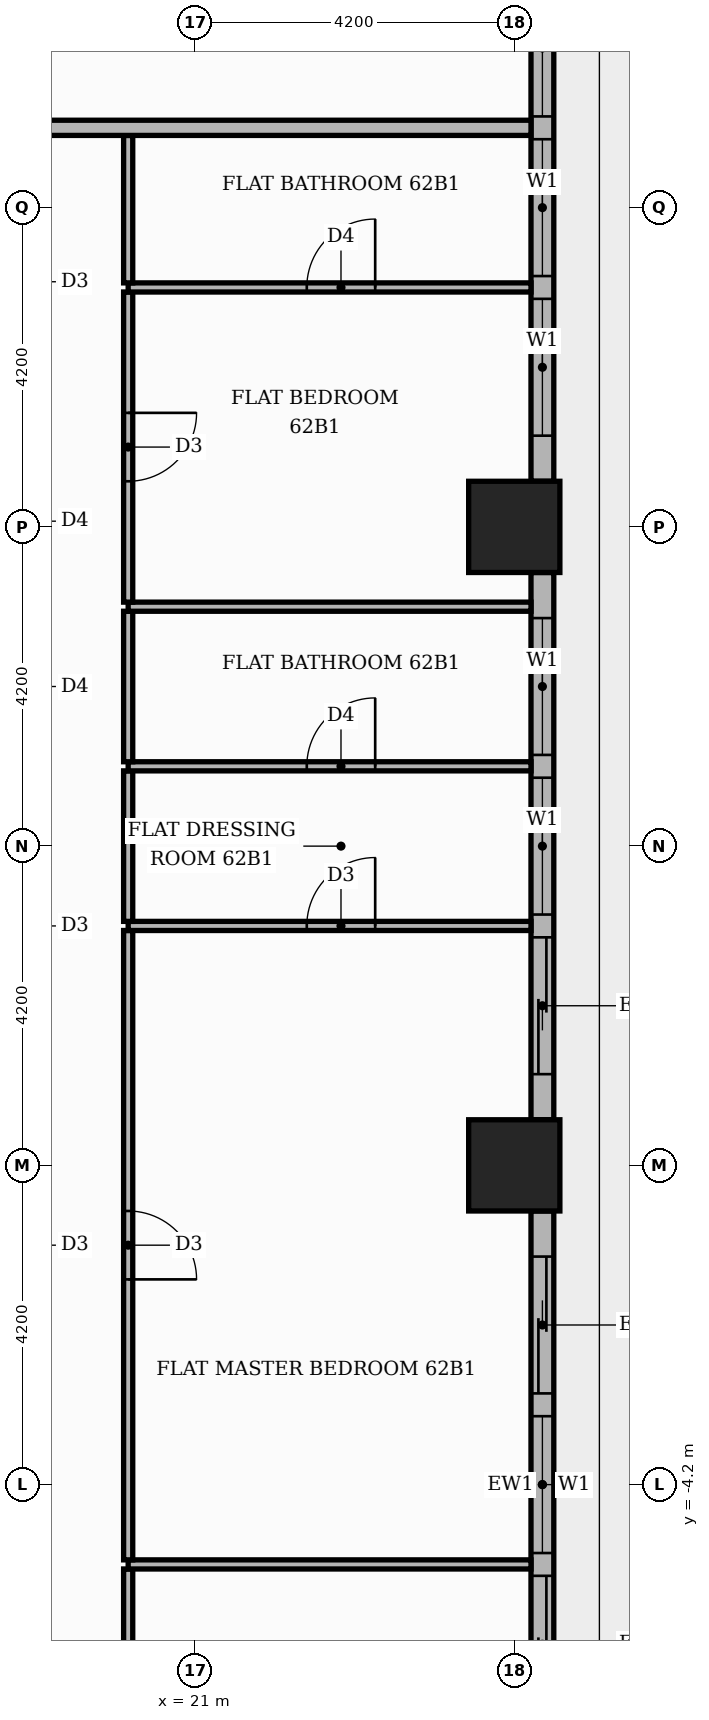
"""IFC4 building model, lengths in metres.
Left out: names, types, materials, properties, quantities, classifications, styles, units other than length and angle.
Written with IfcOpenShell. Run it as: python <this file> out.ifc"""

import sys

from ifc_helpers import new_model, si_unit, direction, frame, frame_2d, origin, origin_2d, place, context, subcontext, project, spatial, rectangle, extrude, element, fill, save


model = new_model("IFC4")
c1 = context("Model", 3, precision=1e-05, world=origin(), true_north=direction((0.0, 1.0)))
c2 = subcontext(c1, "Body", "Model", "MODEL_VIEW")
j1 = project(units=[si_unit("LENGTHUNIT", "METRE"), si_unit("PLANEANGLEUNIT", "RADIAN")], contexts=[c1])
p1 = place(None, origin())
s1 = spatial("IfcSite", under=j1, at=p1, CompositionType="ELEMENT")
p2 = place(p1, origin())
s2 = spatial("IfcBuilding", under=s1, at=p2, CompositionType="ELEMENT")
p3 = place(p2, frame((0.0, 0.0, 260.1)))
s3 = spatial("IfcBuildingStorey", under=s2, at=p3, CompositionType="ELEMENT", Elevation=260.1)
for number, where, z_axis, x_axis in (
    (1, (25.2, 0.0, 0.0), (0.0, 0.0, 1.0), (1.0, 0.0, 0.0)),
    (2, (25.2, 8.4, 0.0), (0.0, 0.0, 1.0), (1.0, 0.0, 0.0)),
):
    element("IfcColumn", number, at=place(p3, frame(where, z_axis=z_axis, x_axis=x_axis)), inside=s3, PredefinedType="COLUMN", context=c2, shape_type="SweptSolid", body=[
        extrude(rectangle(XDim=1.2, YDim=1.2, at=origin_2d()), origin(), (0.0, 0.0, 1.0), 3.9),
    ])
p4 = place(p3, frame((25.57, -7.8, 0.0), z_axis=(0.0, 0.0, 1.0), x_axis=(0.0, 1.0, 0.0)))
e3 = element("IfcWall", 3, at=p4, inside=s3, PredefinedType="STANDARD", context=c2, shape_type="SweptSolid", body=[
    extrude(rectangle(XDim=7.2, YDim=0.3, at=frame_2d((3.6, 0.0))), origin(), (0.0, 0.0, 1.0), 3.48),
])
p5 = place(p4, frame((0.6, 0.0, 0.0)))
e4 = element("IfcOpeningElement", 4, at=p5, cuts=e3, PredefinedType="OPENING", context=c2, shape_type="SweptSolid", body=[
    extrude(rectangle(XDim=1.8, YDim=2.4, at=frame_2d((0.9, 1.2))), frame((0.0, 0.16, 0.0), z_axis=(0.0, -1.0, 0.0), x_axis=(1.0, 0.0, 0.0)), (0.0, 0.0, 1.0), 0.32),
])
p6 = place(p4, frame((2.7, 0.0, 0.9)))
e5 = element("IfcOpeningElement", 5, at=p6, cuts=e3, PredefinedType="OPENING", context=c2, shape_type="SweptSolid", body=[
    extrude(rectangle(XDim=1.8, YDim=2.1, at=frame_2d((0.9, 1.05))), frame((0.0, 0.16, 0.0), z_axis=(0.0, -1.0, 0.0), x_axis=(1.0, 0.0, 0.0)), (0.0, 0.0, 1.0), 0.32),
])
p7 = place(p4, frame((4.8, 0.0, 0.0)))
e6 = element("IfcOpeningElement", 6, at=p7, cuts=e3, PredefinedType="OPENING", context=c2, shape_type="SweptSolid", body=[
    extrude(rectangle(XDim=1.8, YDim=2.4, at=frame_2d((0.9, 1.2))), frame((0.0, 0.16, 0.0), z_axis=(0.0, -1.0, 0.0), x_axis=(1.0, 0.0, 0.0)), (0.0, 0.0, 1.0), 0.32),
])
p8 = place(p3, frame((25.57, 0.6, 0.0), z_axis=(0.0, 0.0, 1.0), x_axis=(0.0, 1.0, 0.0)))
e7 = element("IfcWall", 7, at=p8, inside=s3, PredefinedType="STANDARD", context=c2, shape_type="SweptSolid", body=[
    extrude(rectangle(XDim=7.2, YDim=0.3, at=frame_2d((3.6, 0.0))), origin(), (0.0, 0.0, 1.0), 3.48),
])
p9 = place(p8, frame((0.6, 0.0, 0.0)))
e8 = element("IfcOpeningElement", 8, at=p9, cuts=e7, PredefinedType="OPENING", context=c2, shape_type="SweptSolid", body=[
    extrude(rectangle(XDim=1.8, YDim=2.4, at=frame_2d((0.9, 1.2))), frame((0.0, 0.16, 0.0), z_axis=(0.0, -1.0, 0.0), x_axis=(1.0, 0.0, 0.0)), (0.0, 0.0, 1.0), 0.32),
])
p10 = place(p8, frame((2.7, 0.0, 0.9)))
e9 = element("IfcOpeningElement", 9, at=p10, cuts=e7, PredefinedType="OPENING", context=c2, shape_type="SweptSolid", body=[
    extrude(rectangle(XDim=1.8, YDim=2.1, at=frame_2d((0.9, 1.05))), frame((0.0, 0.16, 0.0), z_axis=(0.0, -1.0, 0.0), x_axis=(1.0, 0.0, 0.0)), (0.0, 0.0, 1.0), 0.32),
])
p11 = place(p8, frame((4.8, 0.0, 0.9)))
e10 = element("IfcOpeningElement", 10, at=p11, cuts=e7, PredefinedType="OPENING", context=c2, shape_type="SweptSolid", body=[
    extrude(rectangle(XDim=1.8, YDim=2.1, at=frame_2d((0.9, 1.05))), frame((0.0, 0.16, 0.0), z_axis=(0.0, -1.0, 0.0), x_axis=(1.0, 0.0, 0.0)), (0.0, 0.0, 1.0), 0.32),
])
p12 = place(p3, frame((25.57, 9.0, 0.0), z_axis=(0.0, 0.0, 1.0), x_axis=(0.0, 1.0, 0.0)))
e11 = element("IfcWall", 11, at=p12, inside=s3, PredefinedType="STANDARD", context=c2, shape_type="SweptSolid", body=[
    extrude(rectangle(XDim=7.2, YDim=0.3, at=frame_2d((3.6, 0.0))), origin(), (0.0, 0.0, 1.0), 3.48),
])
p13 = place(p12, frame((0.6, 0.0, 0.9)))
e12 = element("IfcOpeningElement", 12, at=p13, cuts=e11, PredefinedType="OPENING", context=c2, shape_type="SweptSolid", body=[
    extrude(rectangle(XDim=1.8, YDim=2.1, at=frame_2d((0.9, 1.05))), frame((0.0, 0.16, 0.0), z_axis=(0.0, -1.0, 0.0), x_axis=(1.0, 0.0, 0.0)), (0.0, 0.0, 1.0), 0.32),
])
p14 = place(p12, frame((2.7, 0.0, 0.9)))
e13 = element("IfcOpeningElement", 13, at=p14, cuts=e11, PredefinedType="OPENING", context=c2, shape_type="SweptSolid", body=[
    extrude(rectangle(XDim=1.8, YDim=2.1, at=frame_2d((0.9, 1.05))), frame((0.0, 0.16, 0.0), z_axis=(0.0, -1.0, 0.0), x_axis=(1.0, 0.0, 0.0)), (0.0, 0.0, 1.0), 0.32),
])
p15 = place(p12, frame((4.8, 0.0, 0.9)))
e14 = element("IfcOpeningElement", 14, at=p15, cuts=e11, PredefinedType="OPENING", context=c2, shape_type="SweptSolid", body=[
    extrude(rectangle(XDim=1.8, YDim=2.1, at=frame_2d((0.9, 1.05))), frame((0.0, 0.16, 0.0), z_axis=(0.0, -1.0, 0.0), x_axis=(1.0, 0.0, 0.0)), (0.0, 0.0, 1.0), 0.32),
])
p16 = place(p3, frame((20.12, -11.49, 0.0), z_axis=(0.0, 0.0, 1.0), x_axis=(0.0, 1.0, 0.0)))
e15 = element("IfcWall", 15, at=p16, inside=s3, PredefinedType="PARTITIONING", context=c2, shape_type="SweptSolid", body=[
    extrude(rectangle(XDim=6.18, YDim=0.12, at=frame_2d((3.09, 0.0))), origin(), (0.0, 0.0, 1.0), 3.48),
])
p17 = place(p16, frame((2.59, 0.0, 0.0)))
e16 = element("IfcOpeningElement", 16, at=p17, cuts=e15, PredefinedType="OPENING", context=c2, shape_type="SweptSolid", body=[
    extrude(rectangle(XDim=1.0, YDim=2.1, at=frame_2d((0.5, 1.05))), frame((0.0, 0.07, 0.0), z_axis=(0.0, -1.0, 0.0), x_axis=(1.0, 0.0, 0.0)), (0.0, 0.0, 1.0), 0.14),
])
p18 = place(p3, frame((20.12, -5.25, 0.0), z_axis=(0.0, 0.0, 1.0), x_axis=(1.0, 0.0, 0.0)))
e17 = element("IfcWall", 17, at=p18, inside=s3, PredefinedType="PARTITIONING", context=c2, shape_type="SweptSolid", body=[
    extrude(rectangle(XDim=5.3, YDim=0.12, at=frame_2d((2.65, 0.0))), origin(), (0.0, 0.0, 1.0), 3.48),
])
p19 = place(p3, frame((20.12, -5.19, 0.0), z_axis=(0.0, 0.0, 1.0), x_axis=(0.0, 1.0, 0.0)))
e18 = element("IfcWall", 18, at=p19, inside=s3, PredefinedType="PARTITIONING", context=c2, shape_type="SweptSolid", body=[
    extrude(rectangle(XDim=8.28, YDim=0.12, at=frame_2d((4.14, 0.0))), origin(), (0.0, 0.0, 1.0), 3.48),
])
p20 = place(p19, frame((3.69, 0.0, 0.0)))
e19 = element("IfcOpeningElement", 19, at=p20, cuts=e18, PredefinedType="OPENING", context=c2, shape_type="SweptSolid", body=[
    extrude(rectangle(XDim=0.9, YDim=2.1, at=frame_2d((0.45, 1.05))), frame((0.0, 0.07, 0.0), z_axis=(0.0, -1.0, 0.0), x_axis=(1.0, 0.0, 0.0)), (0.0, 0.0, 1.0), 0.14),
])
p21 = place(p3, frame((20.12, 3.15, 0.0), z_axis=(0.0, 0.0, 1.0), x_axis=(1.0, 0.0, 0.0)))
e20 = element("IfcWall", 20, at=p21, inside=s3, PredefinedType="PARTITIONING", context=c2, shape_type="SweptSolid", body=[
    extrude(rectangle(XDim=5.3, YDim=0.12, at=frame_2d((2.65, 0.0))), origin(), (0.0, 0.0, 1.0), 3.48),
])
p22 = place(p21, frame((2.35, 0.0, 0.0)))
e21 = element("IfcOpeningElement", 21, at=p22, cuts=e20, PredefinedType="OPENING", context=c2, shape_type="SweptSolid", body=[
    extrude(rectangle(XDim=0.9, YDim=2.1, at=frame_2d((0.45, 1.05))), frame((0.0, 0.07, 0.0), z_axis=(0.0, -1.0, 0.0), x_axis=(1.0, 0.0, 0.0)), (0.0, 0.0, 1.0), 0.14),
])
p23 = place(p3, frame((20.12, 3.21, 0.0), z_axis=(0.0, 0.0, 1.0), x_axis=(0.0, 1.0, 0.0)))
e22 = element("IfcWall", 22, at=p23, inside=s3, PredefinedType="PARTITIONING", context=c2, shape_type="SweptSolid", body=[
    extrude(rectangle(XDim=1.98, YDim=0.12, at=frame_2d((0.99, 0.0))), origin(), (0.0, 0.0, 1.0), 3.48),
])
p24 = place(p3, frame((20.12, 5.25, 0.0), z_axis=(0.0, 0.0, 1.0), x_axis=(1.0, 0.0, 0.0)))
e23 = element("IfcWall", 23, at=p24, inside=s3, PredefinedType="PARTITIONING", context=c2, shape_type="SweptSolid", body=[
    extrude(rectangle(XDim=5.3, YDim=0.12, at=frame_2d((2.65, 0.0))), origin(), (0.0, 0.0, 1.0), 3.48),
])
p25 = place(p24, frame((2.35, 0.0, 0.0)))
e24 = element("IfcOpeningElement", 24, at=p25, cuts=e23, PredefinedType="OPENING", context=c2, shape_type="SweptSolid", body=[
    extrude(rectangle(XDim=0.9, YDim=2.1, at=frame_2d((0.45, 1.05))), frame((0.0, 0.07, 0.0), z_axis=(0.0, -1.0, 0.0), x_axis=(1.0, 0.0, 0.0)), (0.0, 0.0, 1.0), 0.14),
])
p26 = place(p3, frame((20.12, 5.31, 0.0), z_axis=(0.0, 0.0, 1.0), x_axis=(0.0, 1.0, 0.0)))
e25 = element("IfcWall", 25, at=p26, inside=s3, PredefinedType="PARTITIONING", context=c2, shape_type="SweptSolid", body=[
    extrude(rectangle(XDim=1.98, YDim=0.12, at=frame_2d((0.99, 0.0))), origin(), (0.0, 0.0, 1.0), 3.48),
])
p27 = place(p3, frame((20.12, 7.35, 0.0), z_axis=(0.0, 0.0, 1.0), x_axis=(1.0, 0.0, 0.0)))
e26 = element("IfcWall", 26, at=p27, inside=s3, PredefinedType="PARTITIONING", context=c2, shape_type="SweptSolid", body=[
    extrude(rectangle(XDim=5.3, YDim=0.12, at=frame_2d((2.65, 0.0))), origin(), (0.0, 0.0, 1.0), 3.48),
])
p28 = place(p3, frame((20.12, 7.41, 0.0), z_axis=(0.0, 0.0, 1.0), x_axis=(0.0, 1.0, 0.0)))
e27 = element("IfcWall", 27, at=p28, inside=s3, PredefinedType="PARTITIONING", context=c2, shape_type="SweptSolid", body=[
    extrude(rectangle(XDim=4.08, YDim=0.12, at=frame_2d((2.04, 0.0))), origin(), (0.0, 0.0, 1.0), 3.48),
])
p29 = place(p28, frame((1.59, 0.0, 0.0)))
e28 = element("IfcOpeningElement", 28, at=p29, cuts=e27, PredefinedType="OPENING", context=c2, shape_type="SweptSolid", body=[
    extrude(rectangle(XDim=0.9, YDim=2.1, at=frame_2d((0.45, 1.05))), frame((0.0, 0.07, 0.0), z_axis=(0.0, -1.0, 0.0), x_axis=(1.0, 0.0, 0.0)), (0.0, 0.0, 1.0), 0.14),
])
p30 = place(p3, frame((20.12, 11.55, 0.0), z_axis=(0.0, 0.0, 1.0), x_axis=(1.0, 0.0, 0.0)))
e29 = element("IfcWall", 29, at=p30, inside=s3, PredefinedType="PARTITIONING", context=c2, shape_type="SweptSolid", body=[
    extrude(rectangle(XDim=5.3, YDim=0.12, at=frame_2d((2.65, 0.0))), origin(), (0.0, 0.0, 1.0), 3.48),
])
p31 = place(p30, frame((2.35, 0.0, 0.0)))
e30 = element("IfcOpeningElement", 30, at=p31, cuts=e29, PredefinedType="OPENING", context=c2, shape_type="SweptSolid", body=[
    extrude(rectangle(XDim=0.9, YDim=2.1, at=frame_2d((0.45, 1.05))), frame((0.0, 0.07, 0.0), z_axis=(0.0, -1.0, 0.0), x_axis=(1.0, 0.0, 0.0)), (0.0, 0.0, 1.0), 0.14),
])
p32 = place(p3, frame((20.12, 11.61, 0.0), z_axis=(0.0, 0.0, 1.0), x_axis=(0.0, 1.0, 0.0)))
e31 = element("IfcWall", 31, at=p32, inside=s3, PredefinedType="PARTITIONING", context=c2, shape_type="SweptSolid", body=[
    extrude(rectangle(XDim=1.94, YDim=0.12, at=frame_2d((0.97, 0.0))), origin(), (0.0, 0.0, 1.0), 3.48),
])
p33 = place(p3, frame((-13.65, 13.65, 0.0), z_axis=(0.0, 0.0, 1.0), x_axis=(1.0, 0.0, 0.0)))
e32 = element("IfcWall", 32, at=p33, inside=s3, PredefinedType="PARTITIONING", context=c2, shape_type="SweptSolid", body=[
    extrude(rectangle(XDim=39.07, YDim=0.2, at=frame_2d((19.535, 0.0))), origin(), (0.0, 0.0, 1.0), 3.48),
])
p34 = place(p33, frame((24.65, 0.0, 0.0)))
e33 = element("IfcOpeningElement", 33, at=p34, cuts=e32, PredefinedType="OPENING", context=c2, shape_type="SweptSolid", body=[
    extrude(rectangle(XDim=1.1, YDim=2.4, at=frame_2d((0.55, 1.2))), frame((0.0, 0.11, 0.0), z_axis=(0.0, -1.0, 0.0), x_axis=(1.0, 0.0, 0.0)), (0.0, 0.0, 1.0), 0.22),
])
p35 = place(p33, frame((14.15, 0.0, 0.0)))
e34 = element("IfcOpeningElement", 34, at=p35, cuts=e32, PredefinedType="OPENING", context=c2, shape_type="SweptSolid", body=[
    extrude(rectangle(XDim=1.1, YDim=2.4, at=frame_2d((0.55, 1.2))), frame((0.0, 0.11, 0.0), z_axis=(0.0, -1.0, 0.0), x_axis=(1.0, 0.0, 0.0)), (0.0, 0.0, 1.0), 0.22),
])
p36 = place(p5, origin())
e35 = element("IfcDoor", 35, at=p36, inside=s3, OperationType="SLIDING_TO_LEFT", PredefinedType="DOOR", context=c2, shape_type="SweptSolid", body=[
    extrude(rectangle(XDim=1.8, YDim=2.4, at=frame_2d((0.9, 1.2))), frame((0.0, 0.025, 0.0), z_axis=(0.0, -1.0, 0.0), x_axis=(1.0, 0.0, 0.0)), (0.0, 0.0, 1.0), 0.05),
])
fill(e4, e35)
p37 = place(p6, origin())
e36 = element("IfcWindow", 36, at=p37, inside=s3, PartitioningType="SINGLE_PANEL", PredefinedType="WINDOW", context=c2, shape_type="SweptSolid", body=[
    extrude(rectangle(XDim=1.8, YDim=2.1, at=frame_2d((0.9, 1.05))), frame((0.0, 0.03, 0.0), z_axis=(0.0, -1.0, 0.0), x_axis=(1.0, 0.0, 0.0)), (0.0, 0.0, 1.0), 0.06),
])
fill(e5, e36)
p38 = place(p7, origin())
e37 = element("IfcDoor", 37, at=p38, inside=s3, OperationType="SLIDING_TO_RIGHT", PredefinedType="DOOR", context=c2, shape_type="SweptSolid", body=[
    extrude(rectangle(XDim=1.8, YDim=2.4, at=frame_2d((0.9, 1.2))), frame((0.0, 0.025, 0.0), z_axis=(0.0, -1.0, 0.0), x_axis=(1.0, 0.0, 0.0)), (0.0, 0.0, 1.0), 0.05),
])
fill(e6, e37)
p39 = place(p9, origin())
e38 = element("IfcDoor", 38, at=p39, inside=s3, OperationType="SLIDING_TO_LEFT", PredefinedType="DOOR", context=c2, shape_type="SweptSolid", body=[
    extrude(rectangle(XDim=1.8, YDim=2.4, at=frame_2d((0.9, 1.2))), frame((0.0, 0.025, 0.0), z_axis=(0.0, -1.0, 0.0), x_axis=(1.0, 0.0, 0.0)), (0.0, 0.0, 1.0), 0.05),
])
fill(e8, e38)
p40 = place(p10, origin())
e39 = element("IfcWindow", 39, at=p40, inside=s3, PartitioningType="SINGLE_PANEL", PredefinedType="WINDOW", context=c2, shape_type="SweptSolid", body=[
    extrude(rectangle(XDim=1.8, YDim=2.1, at=frame_2d((0.9, 1.05))), frame((0.0, 0.03, 0.0), z_axis=(0.0, -1.0, 0.0), x_axis=(1.0, 0.0, 0.0)), (0.0, 0.0, 1.0), 0.06),
])
fill(e9, e39)
p41 = place(p11, origin())
e40 = element("IfcWindow", 40, at=p41, inside=s3, PartitioningType="SINGLE_PANEL", PredefinedType="WINDOW", context=c2, shape_type="SweptSolid", body=[
    extrude(rectangle(XDim=1.8, YDim=2.1, at=frame_2d((0.9, 1.05))), frame((0.0, 0.03, 0.0), z_axis=(0.0, -1.0, 0.0), x_axis=(1.0, 0.0, 0.0)), (0.0, 0.0, 1.0), 0.06),
])
fill(e10, e40)
p42 = place(p13, origin())
e41 = element("IfcWindow", 41, at=p42, inside=s3, PartitioningType="SINGLE_PANEL", PredefinedType="WINDOW", context=c2, shape_type="SweptSolid", body=[
    extrude(rectangle(XDim=1.8, YDim=2.1, at=frame_2d((0.9, 1.05))), frame((0.0, 0.03, 0.0), z_axis=(0.0, -1.0, 0.0), x_axis=(1.0, 0.0, 0.0)), (0.0, 0.0, 1.0), 0.06),
])
fill(e12, e41)
p43 = place(p14, origin())
e42 = element("IfcWindow", 42, at=p43, inside=s3, PartitioningType="SINGLE_PANEL", PredefinedType="WINDOW", context=c2, shape_type="SweptSolid", body=[
    extrude(rectangle(XDim=1.8, YDim=2.1, at=frame_2d((0.9, 1.05))), frame((0.0, 0.03, 0.0), z_axis=(0.0, -1.0, 0.0), x_axis=(1.0, 0.0, 0.0)), (0.0, 0.0, 1.0), 0.06),
])
fill(e13, e42)
p44 = place(p15, origin())
e43 = element("IfcWindow", 43, at=p44, inside=s3, PartitioningType="SINGLE_PANEL", PredefinedType="WINDOW", context=c2, shape_type="SweptSolid", body=[
    extrude(rectangle(XDim=1.8, YDim=2.1, at=frame_2d((0.9, 1.05))), frame((0.0, 0.03, 0.0), z_axis=(0.0, -1.0, 0.0), x_axis=(1.0, 0.0, 0.0)), (0.0, 0.0, 1.0), 0.06),
])
fill(e14, e43)
p45 = place(p20, frame((0.9, 0.0, 0.0), z_axis=(0.0, 0.0, 1.0), x_axis=(-1.0, 0.0, 0.0)))
e44 = element("IfcDoor", 44, at=p45, inside=s3, OperationType="SINGLE_SWING_LEFT", PredefinedType="DOOR", context=c2, shape_type="SweptSolid", body=[
    extrude(rectangle(XDim=0.9, YDim=2.1, at=frame_2d((0.45, 1.05))), frame((0.0, 0.025, 0.0), z_axis=(0.0, -1.0, 0.0), x_axis=(1.0, 0.0, 0.0)), (0.0, 0.0, 1.0), 0.05),
])
fill(e19, e44)
p46 = place(p22, origin())
e45 = element("IfcDoor", 45, at=p46, inside=s3, OperationType="SINGLE_SWING_RIGHT", PredefinedType="DOOR", context=c2, shape_type="SweptSolid", body=[
    extrude(rectangle(XDim=0.9, YDim=2.1, at=frame_2d((0.45, 1.05))), frame((0.0, 0.025, 0.0), z_axis=(0.0, -1.0, 0.0), x_axis=(1.0, 0.0, 0.0)), (0.0, 0.0, 1.0), 0.05),
])
fill(e21, e45)
p47 = place(p25, origin())
e46 = element("IfcDoor", 46, at=p47, inside=s3, OperationType="SINGLE_SWING_RIGHT", PredefinedType="DOOR", context=c2, shape_type="SweptSolid", body=[
    extrude(rectangle(XDim=0.9, YDim=2.1, at=frame_2d((0.45, 1.05))), frame((0.0, 0.025, 0.0), z_axis=(0.0, -1.0, 0.0), x_axis=(1.0, 0.0, 0.0)), (0.0, 0.0, 1.0), 0.05),
])
fill(e24, e46)
p48 = place(p29, frame((0.9, 0.0, 0.0), z_axis=(0.0, 0.0, 1.0), x_axis=(-1.0, 0.0, 0.0)))
e47 = element("IfcDoor", 47, at=p48, inside=s3, OperationType="SINGLE_SWING_RIGHT", PredefinedType="DOOR", context=c2, shape_type="SweptSolid", body=[
    extrude(rectangle(XDim=0.9, YDim=2.1, at=frame_2d((0.45, 1.05))), frame((0.0, 0.025, 0.0), z_axis=(0.0, -1.0, 0.0), x_axis=(1.0, 0.0, 0.0)), (0.0, 0.0, 1.0), 0.05),
])
fill(e28, e47)
p49 = place(p31, origin())
e48 = element("IfcDoor", 48, at=p49, inside=s3, OperationType="SINGLE_SWING_RIGHT", PredefinedType="DOOR", context=c2, shape_type="SweptSolid", body=[
    extrude(rectangle(XDim=0.9, YDim=2.1, at=frame_2d((0.45, 1.05))), frame((0.0, 0.025, 0.0), z_axis=(0.0, -1.0, 0.0), x_axis=(1.0, 0.0, 0.0)), (0.0, 0.0, 1.0), 0.05),
])
fill(e30, e48)
save(model, sys.argv[1])
